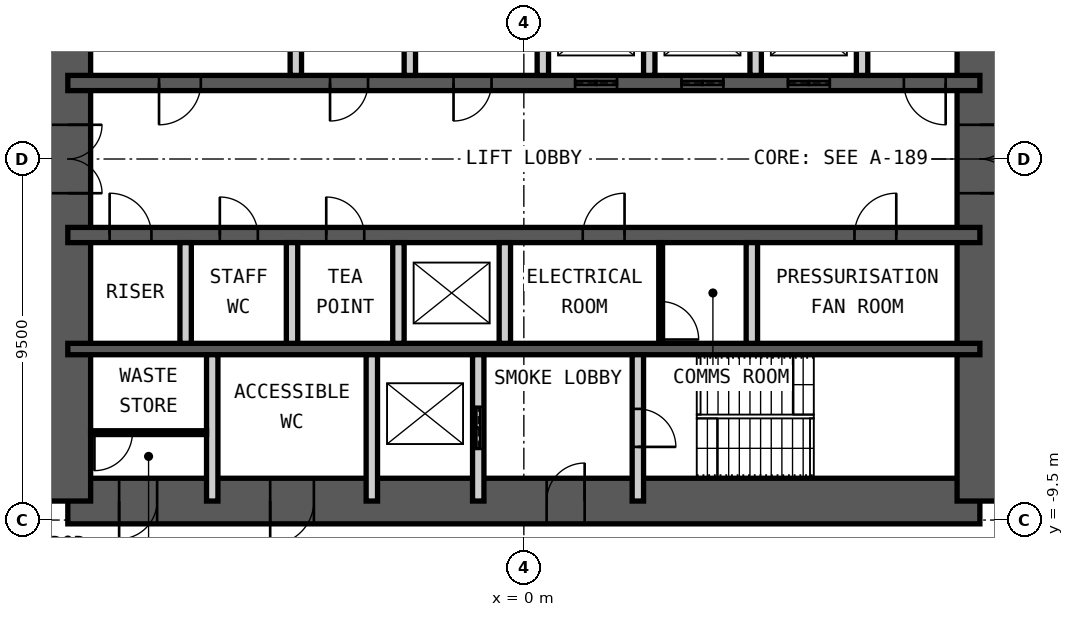
"""IFC4 building model, lengths in metres.
Left out: names, types, materials, properties, quantities, classifications, styles, units other than length and angle.
Written with IfcOpenShell. Run it as: python <this file> out.ifc"""

import sys

from ifc_helpers import new_model, si_unit, direction, frame, frame_2d, origin, place, context, subcontext, project, spatial, rectangle, extrude, element, fill, save


model = new_model("IFC4")
c1 = context("Model", 3, precision=1e-05, world=origin(), true_north=direction((0.0, 1.0)))
c2 = subcontext(c1, "Body", "Model", "MODEL_VIEW")
j1 = project(units=[si_unit("LENGTHUNIT", "METRE"), si_unit("PLANEANGLEUNIT", "RADIAN")], contexts=[c1])
p1 = place(None, origin())
s1 = spatial("IfcSite", under=j1, at=p1, CompositionType="ELEMENT")
p2 = place(p1, origin())
s2 = spatial("IfcBuilding", under=s1, at=p2, CompositionType="ELEMENT")
p3 = place(p2, frame((0.0, 0.0, 188.8)))
s3 = spatial("IfcBuildingStorey", under=s2, at=p3, CompositionType="ELEMENT", Elevation=188.8)
p4 = place(p3, frame((-12.0, -9.0, 0.0), z_axis=(0.0, 0.0, 1.0), x_axis=(1.0, 0.0, 0.0)))
e1 = element("IfcWall", 1, at=p4, inside=s3, PredefinedType="SHEAR", context=c2, shape_type="SweptSolid", body=[
    extrude(rectangle(XDim=24.0, YDim=1.2, at=frame_2d((12.0, 0.0))), origin(), (0.0, 0.0, 1.0), 4.2),
])
p5 = place(p4, frame((1.35, 0.0, 0.0)))
e2 = element("IfcOpeningElement", 2, at=p5, cuts=e1, PredefinedType="OPENING", context=c2, shape_type="SweptSolid", body=[
    extrude(rectangle(XDim=1.0, YDim=2.1, at=frame_2d((0.5, 1.05))), frame((0.0, 0.61, 0.0), z_axis=(0.0, -1.0, 0.0), x_axis=(1.0, 0.0, 0.0)), (0.0, 0.0, 1.0), 1.22),
])
p6 = place(p4, frame((5.325, 0.0, 0.0)))
e3 = element("IfcOpeningElement", 3, at=p6, cuts=e1, PredefinedType="OPENING", context=c2, shape_type="SweptSolid", body=[
    extrude(rectangle(XDim=1.15, YDim=2.1, at=frame_2d((0.575, 1.05))), frame((0.0, 0.61, 0.0), z_axis=(0.0, -1.0, 0.0), x_axis=(1.0, 0.0, 0.0)), (0.0, 0.0, 1.0), 1.22),
])
p7 = place(p4, frame((12.6, 0.0, 0.0)))
e4 = element("IfcOpeningElement", 4, at=p7, cuts=e1, PredefinedType="OPENING", context=c2, shape_type="SweptSolid", body=[
    extrude(rectangle(XDim=1.0, YDim=2.1, at=frame_2d((0.5, 1.05))), frame((0.0, 0.61, 0.0), z_axis=(0.0, -1.0, 0.0), x_axis=(1.0, 0.0, 0.0)), (0.0, 0.0, 1.0), 1.22),
])
p8 = place(p3, frame((12.0, -9.0, 0.0), z_axis=(0.0, 0.0, 1.0), x_axis=(0.0, 1.0, 0.0)))
e5 = element("IfcWall", 5, at=p8, inside=s3, PredefinedType="SHEAR", context=c2, shape_type="SweptSolid", body=[
    extrude(rectangle(XDim=18.0, YDim=1.2, at=frame_2d((9.0, 0.0))), origin(), (0.0, 0.0, 1.0), 4.2),
])
p9 = place(p8, frame((8.1, 0.0, 0.0)))
e6 = element("IfcOpeningElement", 6, at=p9, cuts=e5, PredefinedType="OPENING", context=c2, shape_type="SweptSolid", body=[
    extrude(rectangle(XDim=1.8, YDim=2.1, at=frame_2d((0.9, 1.05))), frame((0.0, 0.61, 0.0), z_axis=(0.0, -1.0, 0.0), x_axis=(1.0, 0.0, 0.0)), (0.0, 0.0, 1.0), 1.22),
])
p10 = place(p3, frame((-12.0, -9.0, 0.0), z_axis=(0.0, 0.0, 1.0), x_axis=(0.0, 1.0, 0.0)))
e7 = element("IfcWall", 7, at=p10, inside=s3, PredefinedType="SHEAR", context=c2, shape_type="SweptSolid", body=[
    extrude(rectangle(XDim=18.0, YDim=1.2, at=frame_2d((9.0, 0.0))), origin(), (0.0, 0.0, 1.0), 4.2),
])
p11 = place(p10, frame((8.1, 0.0, 0.0)))
e8 = element("IfcOpeningElement", 8, at=p11, cuts=e7, PredefinedType="OPENING", context=c2, shape_type="SweptSolid", body=[
    extrude(rectangle(XDim=1.8, YDim=2.1, at=frame_2d((0.9, 1.05))), frame((0.0, 0.61, 0.0), z_axis=(0.0, -1.0, 0.0), x_axis=(1.0, 0.0, 0.0)), (0.0, 0.0, 1.0), 1.22),
])
p12 = place(p3, frame((-12.0, 2.0, 0.0), z_axis=(0.0, 0.0, 1.0), x_axis=(1.0, 0.0, 0.0)))
e9 = element("IfcWall", 9, at=p12, inside=s3, PredefinedType="SHEAR", context=c2, shape_type="SweptSolid", body=[
    extrude(rectangle(XDim=24.0, YDim=0.4, at=frame_2d((12.0, 0.0))), origin(), (0.0, 0.0, 1.0), 4.2),
])
p13 = place(p12, frame((2.4, 0.0, 0.0)))
e10 = element("IfcOpeningElement", 10, at=p13, cuts=e9, PredefinedType="OPENING", context=c2, shape_type="SweptSolid", body=[
    extrude(rectangle(XDim=1.1, YDim=2.1, at=frame_2d((0.55, 1.05))), frame((0.0, 0.21, 0.0), z_axis=(0.0, -1.0, 0.0), x_axis=(1.0, 0.0, 0.0)), (0.0, 0.0, 1.0), 0.42),
])
p14 = place(p12, frame((22.0, 0.0, 0.0)))
e11 = element("IfcOpeningElement", 11, at=p14, cuts=e9, PredefinedType="OPENING", context=c2, shape_type="SweptSolid", body=[
    extrude(rectangle(XDim=1.1, YDim=2.1, at=frame_2d((0.55, 1.05))), frame((0.0, 0.21, 0.0), z_axis=(0.0, -1.0, 0.0), x_axis=(1.0, 0.0, 0.0)), (0.0, 0.0, 1.0), 0.42),
])
p15 = place(p12, frame((10.15, 0.0, 0.0)))
e12 = element("IfcOpeningElement", 12, at=p15, cuts=e9, PredefinedType="OPENING", context=c2, shape_type="SweptSolid", body=[
    extrude(rectangle(XDim=1.0, YDim=2.1, at=frame_2d((0.5, 1.05))), frame((0.0, 0.21, 0.0), z_axis=(0.0, -1.0, 0.0), x_axis=(1.0, 0.0, 0.0)), (0.0, 0.0, 1.0), 0.42),
])
p16 = place(p12, frame((6.9, 0.0, 0.0)))
e13 = element("IfcOpeningElement", 13, at=p16, cuts=e9, PredefinedType="OPENING", context=c2, shape_type="SweptSolid", body=[
    extrude(rectangle(XDim=1.0, YDim=2.1, at=frame_2d((0.5, 1.05))), frame((0.0, 0.21, 0.0), z_axis=(0.0, -1.0, 0.0), x_axis=(1.0, 0.0, 0.0)), (0.0, 0.0, 1.0), 0.42),
])
p17 = place(p12, frame((13.35, 0.0, 0.0)))
e14 = element("IfcOpeningElement", 14, at=p17, cuts=e9, PredefinedType="OPENING", context=c2, shape_type="SweptSolid", body=[
    extrude(rectangle(XDim=1.1, YDim=2.4, at=frame_2d((0.55, 1.2))), frame((0.0, 0.21, 0.0), z_axis=(0.0, -1.0, 0.0), x_axis=(1.0, 0.0, 0.0)), (0.0, 0.0, 1.0), 0.42),
])
p18 = place(p12, frame((16.15, 0.0, 0.0)))
e15 = element("IfcOpeningElement", 15, at=p18, cuts=e9, PredefinedType="OPENING", context=c2, shape_type="SweptSolid", body=[
    extrude(rectangle(XDim=1.1, YDim=2.4, at=frame_2d((0.55, 1.2))), frame((0.0, 0.21, 0.0), z_axis=(0.0, -1.0, 0.0), x_axis=(1.0, 0.0, 0.0)), (0.0, 0.0, 1.0), 0.42),
])
p19 = place(p12, frame((18.95, 0.0, 0.0)))
e16 = element("IfcOpeningElement", 16, at=p19, cuts=e9, PredefinedType="OPENING", context=c2, shape_type="SweptSolid", body=[
    extrude(rectangle(XDim=1.1, YDim=2.4, at=frame_2d((0.55, 1.2))), frame((0.0, 0.21, 0.0), z_axis=(0.0, -1.0, 0.0), x_axis=(1.0, 0.0, 0.0)), (0.0, 0.0, 1.0), 0.42),
])
p20 = place(p3, frame((-12.0, -2.0, 0.0), z_axis=(0.0, 0.0, 1.0), x_axis=(1.0, 0.0, 0.0)))
e17 = element("IfcWall", 17, at=p20, inside=s3, PredefinedType="SHEAR", context=c2, shape_type="SweptSolid", body=[
    extrude(rectangle(XDim=24.0, YDim=0.4, at=frame_2d((12.0, 0.0))), origin(), (0.0, 0.0, 1.0), 4.2),
])
p21 = place(p20, frame((1.1, 0.0, 0.0)))
e18 = element("IfcOpeningElement", 18, at=p21, cuts=e17, PredefinedType="OPENING", context=c2, shape_type="SweptSolid", body=[
    extrude(rectangle(XDim=1.1, YDim=2.1, at=frame_2d((0.55, 1.05))), frame((0.0, 0.21, 0.0), z_axis=(0.0, -1.0, 0.0), x_axis=(1.0, 0.0, 0.0)), (0.0, 0.0, 1.0), 0.42),
])
p22 = place(p20, frame((13.55, 0.0, 0.0)))
e19 = element("IfcOpeningElement", 19, at=p22, cuts=e17, PredefinedType="OPENING", context=c2, shape_type="SweptSolid", body=[
    extrude(rectangle(XDim=1.1, YDim=2.1, at=frame_2d((0.55, 1.05))), frame((0.0, 0.21, 0.0), z_axis=(0.0, -1.0, 0.0), x_axis=(1.0, 0.0, 0.0)), (0.0, 0.0, 1.0), 0.42),
])
p23 = place(p20, frame((20.7, 0.0, 0.0)))
e20 = element("IfcOpeningElement", 20, at=p23, cuts=e17, PredefinedType="OPENING", context=c2, shape_type="SweptSolid", body=[
    extrude(rectangle(XDim=1.1, YDim=2.1, at=frame_2d((0.55, 1.05))), frame((0.0, 0.21, 0.0), z_axis=(0.0, -1.0, 0.0), x_axis=(1.0, 0.0, 0.0)), (0.0, 0.0, 1.0), 0.42),
])
p24 = place(p20, frame((4.0, 0.0, 0.0)))
e21 = element("IfcOpeningElement", 21, at=p24, cuts=e17, PredefinedType="OPENING", context=c2, shape_type="SweptSolid", body=[
    extrude(rectangle(XDim=1.0, YDim=2.1, at=frame_2d((0.5, 1.05))), frame((0.0, 0.21, 0.0), z_axis=(0.0, -1.0, 0.0), x_axis=(1.0, 0.0, 0.0)), (0.0, 0.0, 1.0), 0.42),
])
p25 = place(p20, frame((6.8, 0.0, 0.0)))
e22 = element("IfcOpeningElement", 22, at=p25, cuts=e17, PredefinedType="OPENING", context=c2, shape_type="SweptSolid", body=[
    extrude(rectangle(XDim=1.0, YDim=2.1, at=frame_2d((0.5, 1.05))), frame((0.0, 0.21, 0.0), z_axis=(0.0, -1.0, 0.0), x_axis=(1.0, 0.0, 0.0)), (0.0, 0.0, 1.0), 0.42),
])
p26 = place(p3, frame((-12.0, -5.0, 0.0), z_axis=(0.0, 0.0, 1.0), x_axis=(1.0, 0.0, 0.0)))
e23 = element("IfcWall", 23, at=p26, inside=s3, PredefinedType="SHEAR", context=c2, shape_type="SweptSolid", body=[
    extrude(rectangle(XDim=24.0, YDim=0.3, at=frame_2d((12.0, 0.0))), origin(), (0.0, 0.0, 1.0), 4.2),
])
for number, where, z_axis, x_axis in (
    (24, (-6.0, 2.2, 0.0), (0.0, 0.0, 1.0), (0.0, 1.0, 0.0)),
    (25, (-3.0, 2.2, 0.0), (0.0, 0.0, 1.0), (0.0, 1.0, 0.0)),
    (26, (0.5, 2.2, 0.0), (0.0, 0.0, 1.0), (0.0, 1.0, 0.0)),
    (27, (3.3, 2.2, 0.0), (0.0, 0.0, 1.0), (0.0, 1.0, 0.0)),
    (28, (6.1, 2.2, 0.0), (0.0, 0.0, 1.0), (0.0, 1.0, 0.0)),
    (29, (8.9, 2.2, 0.0), (0.0, 0.0, 1.0), (0.0, 1.0, 0.0)),
    (30, (-8.9, -4.85, 0.0), (0.0, 0.0, 1.0), (0.0, 1.0, 0.0)),
    (31, (-6.1, -4.85, 0.0), (0.0, 0.0, 1.0), (0.0, 1.0, 0.0)),
    (32, (-3.3, -4.85, 0.0), (0.0, 0.0, 1.0), (0.0, 1.0, 0.0)),
    (33, (-0.5, -4.85, 0.0), (0.0, 0.0, 1.0), (0.0, 1.0, 0.0)),
    (34, (6.0, -4.85, 0.0), (0.0, 0.0, 1.0), (0.0, 1.0, 0.0)),
):
    element("IfcWall", number, at=place(p3, frame(where, z_axis=z_axis, x_axis=x_axis)), inside=s3, PredefinedType="PARTITIONING", context=c2, shape_type="SweptSolid", body=[
        extrude(rectangle(XDim=2.65, YDim=0.3, at=frame_2d((1.325, 0.0))), origin(), (0.0, 0.0, 1.0), 3.98),
    ])
for number, where, z_axis, x_axis in (
    (35, (-8.2, -9.0, 0.0), (0.0, 0.0, 1.0), (0.0, 1.0, 0.0)),
    (36, (-4.0, -9.0, 0.0), (0.0, 0.0, 1.0), (0.0, 1.0, 0.0)),
):
    element("IfcWall", number, at=place(p3, frame(where, z_axis=z_axis, x_axis=x_axis)), inside=s3, PredefinedType="PARTITIONING", context=c2, shape_type="SweptSolid", body=[
        extrude(rectangle(XDim=3.85, YDim=0.3, at=frame_2d((1.925, 0.0))), origin(), (0.0, 0.0, 1.0), 3.98),
    ])
p27 = place(p3, frame((-1.2, -9.0, 0.0), z_axis=(0.0, 0.0, 1.0), x_axis=(0.0, 1.0, 0.0)))
e37 = element("IfcWall", 37, at=p27, inside=s3, PredefinedType="PARTITIONING", context=c2, shape_type="SweptSolid", body=[
    extrude(rectangle(XDim=3.85, YDim=0.3, at=frame_2d((1.925, 0.0))), origin(), (0.0, 0.0, 1.0), 3.98),
])
p28 = place(p27, frame((1.375, 0.0, 0.0)))
e38 = element("IfcOpeningElement", 38, at=p28, cuts=e37, PredefinedType="OPENING", context=c2, shape_type="SweptSolid", body=[
    extrude(rectangle(XDim=1.1, YDim=2.4, at=frame_2d((0.55, 1.2))), frame((0.0, 0.16, 0.0), z_axis=(0.0, -1.0, 0.0), x_axis=(1.0, 0.0, 0.0)), (0.0, 0.0, 1.0), 0.32),
])
p29 = place(p3, frame((3.0, -9.0, 0.0), z_axis=(0.0, 0.0, 1.0), x_axis=(0.0, 1.0, 0.0)))
e39 = element("IfcWall", 39, at=p29, inside=s3, PredefinedType="PARTITIONING", context=c2, shape_type="SweptSolid", body=[
    extrude(rectangle(XDim=3.85, YDim=0.3, at=frame_2d((1.925, 0.0))), origin(), (0.0, 0.0, 1.0), 3.98),
])
p30 = place(p29, frame((1.425, 0.0, 0.0)))
e40 = element("IfcOpeningElement", 40, at=p30, cuts=e39, PredefinedType="OPENING", context=c2, shape_type="SweptSolid", body=[
    extrude(rectangle(XDim=1.0, YDim=2.1, at=frame_2d((0.5, 1.05))), frame((0.0, 0.16, 0.0), z_axis=(0.0, -1.0, 0.0), x_axis=(1.0, 0.0, 0.0)), (0.0, 0.0, 1.0), 0.32),
])
p31 = place(p3, frame((3.6, -4.85, 0.0), z_axis=(0.0, 0.0, 1.0), x_axis=(0.0, 1.0, 0.0)))
e41 = element("IfcWall", 41, at=p31, inside=s3, PredefinedType="PARTITIONING", context=c2, shape_type="SweptSolid", body=[
    extrude(rectangle(XDim=2.65, YDim=0.1, at=frame_2d((1.325, 0.0))), origin(), (0.0, 0.0, 1.0), 3.98),
])
p32 = place(p31, frame((0.1, 0.0, 0.0)))
e42 = element("IfcOpeningElement", 42, at=p32, cuts=e41, PredefinedType="OPENING", context=c2, shape_type="SweptSolid", body=[
    extrude(rectangle(XDim=1.0, YDim=2.4, at=frame_2d((0.5, 1.2))), frame((0.0, 0.06, 0.0), z_axis=(0.0, -1.0, 0.0), x_axis=(1.0, 0.0, 0.0)), (0.0, 0.0, 1.0), 0.12),
])
p33 = place(p3, frame((-11.4, -7.2, 0.0), z_axis=(0.0, 0.0, 1.0), x_axis=(1.0, 0.0, 0.0)))
e43 = element("IfcWall", 43, at=p33, inside=s3, PredefinedType="PARTITIONING", context=c2, shape_type="SweptSolid", body=[
    extrude(rectangle(XDim=3.05, YDim=0.1, at=frame_2d((1.525, 0.0))), origin(), (0.0, 0.0, 1.0), 3.98),
])
p34 = place(p33, frame((0.1, 0.0, 0.0)))
e44 = element("IfcOpeningElement", 44, at=p34, cuts=e43, PredefinedType="OPENING", context=c2, shape_type="SweptSolid", body=[
    extrude(rectangle(XDim=1.0, YDim=2.4, at=frame_2d((0.5, 1.2))), frame((0.0, 0.06, 0.0), z_axis=(0.0, -1.0, 0.0), x_axis=(1.0, 0.0, 0.0)), (0.0, 0.0, 1.0), 0.12),
])
p35 = place(p5, origin())
e45 = element("IfcDoor", 45, at=p35, inside=s3, OperationType="SINGLE_SWING_LEFT", PredefinedType="DOOR", context=c2, shape_type="SweptSolid", body=[
    extrude(rectangle(XDim=1.0, YDim=2.1, at=frame_2d((0.5, 1.05))), frame((0.0, 0.025, 0.0), z_axis=(0.0, -1.0, 0.0), x_axis=(1.0, 0.0, 0.0)), (0.0, 0.0, 1.0), 0.05),
])
fill(e2, e45)
p36 = place(p6, origin())
e46 = element("IfcDoor", 46, at=p36, inside=s3, OperationType="SINGLE_SWING_LEFT", PredefinedType="DOOR", context=c2, shape_type="SweptSolid", body=[
    extrude(rectangle(XDim=1.15, YDim=2.1, at=frame_2d((0.575, 1.05))), frame((0.0, 0.025, 0.0), z_axis=(0.0, -1.0, 0.0), x_axis=(1.0, 0.0, 0.0)), (0.0, 0.0, 1.0), 0.05),
])
fill(e3, e46)
p37 = place(p7, origin())
e47 = element("IfcDoor", 47, at=p37, inside=s3, OperationType="SINGLE_SWING_LEFT", PredefinedType="DOOR", context=c2, shape_type="SweptSolid", body=[
    extrude(rectangle(XDim=1.0, YDim=2.1, at=frame_2d((0.5, 1.05))), frame((0.0, 0.025, 0.0), z_axis=(0.0, -1.0, 0.0), x_axis=(1.0, 0.0, 0.0)), (0.0, 0.0, 1.0), 0.05),
])
fill(e4, e47)
p38 = place(p30, origin())
e48 = element("IfcDoor", 48, at=p38, inside=s3, OperationType="SINGLE_SWING_LEFT", PredefinedType="DOOR", context=c2, shape_type="SweptSolid", body=[
    extrude(rectangle(XDim=1.0, YDim=2.1, at=frame_2d((0.5, 1.05))), frame((0.0, 0.025, 0.0), z_axis=(0.0, -1.0, 0.0), x_axis=(1.0, 0.0, 0.0)), (0.0, 0.0, 1.0), 0.05),
])
fill(e40, e48)
p39 = place(p13, origin())
e49 = element("IfcDoor", 49, at=p39, inside=s3, OperationType="SINGLE_SWING_LEFT", PredefinedType="DOOR", context=c2, shape_type="SweptSolid", body=[
    extrude(rectangle(XDim=1.1, YDim=2.1, at=frame_2d((0.55, 1.05))), frame((0.0, 0.025, 0.0), z_axis=(0.0, -1.0, 0.0), x_axis=(1.0, 0.0, 0.0)), (0.0, 0.0, 1.0), 0.05),
])
fill(e10, e49)
p40 = place(p21, origin())
e50 = element("IfcDoor", 50, at=p40, inside=s3, OperationType="SINGLE_SWING_RIGHT", PredefinedType="DOOR", context=c2, shape_type="SweptSolid", body=[
    extrude(rectangle(XDim=1.1, YDim=2.1, at=frame_2d((0.55, 1.05))), frame((0.0, 0.025, 0.0), z_axis=(0.0, -1.0, 0.0), x_axis=(1.0, 0.0, 0.0)), (0.0, 0.0, 1.0), 0.05),
])
fill(e18, e50)
p41 = place(p14, origin())
e51 = element("IfcDoor", 51, at=p41, inside=s3, OperationType="SINGLE_SWING_RIGHT", PredefinedType="DOOR", context=c2, shape_type="SweptSolid", body=[
    extrude(rectangle(XDim=1.1, YDim=2.1, at=frame_2d((0.55, 1.05))), frame((0.0, 0.025, 0.0), z_axis=(0.0, -1.0, 0.0), x_axis=(1.0, 0.0, 0.0)), (0.0, 0.0, 1.0), 0.05),
])
fill(e11, e51)
p42 = place(p15, origin())
e52 = element("IfcDoor", 52, at=p42, inside=s3, OperationType="SINGLE_SWING_LEFT", PredefinedType="DOOR", context=c2, shape_type="SweptSolid", body=[
    extrude(rectangle(XDim=1.0, YDim=2.1, at=frame_2d((0.5, 1.05))), frame((0.0, 0.025, 0.0), z_axis=(0.0, -1.0, 0.0), x_axis=(1.0, 0.0, 0.0)), (0.0, 0.0, 1.0), 0.05),
])
fill(e12, e52)
p43 = place(p22, origin())
e53 = element("IfcDoor", 53, at=p43, inside=s3, OperationType="SINGLE_SWING_LEFT", PredefinedType="DOOR", context=c2, shape_type="SweptSolid", body=[
    extrude(rectangle(XDim=1.1, YDim=2.1, at=frame_2d((0.55, 1.05))), frame((0.0, 0.025, 0.0), z_axis=(0.0, -1.0, 0.0), x_axis=(1.0, 0.0, 0.0)), (0.0, 0.0, 1.0), 0.05),
])
fill(e19, e53)
p44 = place(p23, origin())
e54 = element("IfcDoor", 54, at=p44, inside=s3, OperationType="SINGLE_SWING_LEFT", PredefinedType="DOOR", context=c2, shape_type="SweptSolid", body=[
    extrude(rectangle(XDim=1.1, YDim=2.1, at=frame_2d((0.55, 1.05))), frame((0.0, 0.025, 0.0), z_axis=(0.0, -1.0, 0.0), x_axis=(1.0, 0.0, 0.0)), (0.0, 0.0, 1.0), 0.05),
])
fill(e20, e54)
p45 = place(p9, origin())
e55 = element("IfcDoor", 55, at=p45, inside=s3, OperationType="DOUBLE_DOOR_DOUBLE_SWING", PredefinedType="DOOR", context=c2, shape_type="SweptSolid", body=[
    extrude(rectangle(XDim=1.8, YDim=2.1, at=frame_2d((0.9, 1.05))), frame((0.0, 0.025, 0.0), z_axis=(0.0, -1.0, 0.0), x_axis=(1.0, 0.0, 0.0)), (0.0, 0.0, 1.0), 0.05),
])
fill(e6, e55)
p46 = place(p11, origin())
e56 = element("IfcDoor", 56, at=p46, inside=s3, OperationType="DOUBLE_DOOR_DOUBLE_SWING", PredefinedType="DOOR", context=c2, shape_type="SweptSolid", body=[
    extrude(rectangle(XDim=1.8, YDim=2.1, at=frame_2d((0.9, 1.05))), frame((0.0, 0.025, 0.0), z_axis=(0.0, -1.0, 0.0), x_axis=(1.0, 0.0, 0.0)), (0.0, 0.0, 1.0), 0.05),
])
fill(e8, e56)
p47 = place(p28, origin())
e57 = element("IfcDoor", 57, at=p47, inside=s3, OperationType="DOUBLE_DOOR_SLIDING", PredefinedType="DOOR", context=c2, shape_type="SweptSolid", body=[
    extrude(rectangle(XDim=1.1, YDim=2.4, at=frame_2d((0.55, 1.2))), frame((0.0, 0.025, 0.0), z_axis=(0.0, -1.0, 0.0), x_axis=(1.0, 0.0, 0.0)), (0.0, 0.0, 1.0), 0.05),
])
fill(e38, e57)
p48 = place(p16, origin())
e58 = element("IfcDoor", 58, at=p48, inside=s3, OperationType="SINGLE_SWING_LEFT", PredefinedType="DOOR", context=c2, shape_type="SweptSolid", body=[
    extrude(rectangle(XDim=1.0, YDim=2.1, at=frame_2d((0.5, 1.05))), frame((0.0, 0.025, 0.0), z_axis=(0.0, -1.0, 0.0), x_axis=(1.0, 0.0, 0.0)), (0.0, 0.0, 1.0), 0.05),
])
fill(e13, e58)
p49 = place(p17, origin())
e59 = element("IfcDoor", 59, at=p49, inside=s3, OperationType="DOUBLE_DOOR_SLIDING", PredefinedType="DOOR", context=c2, shape_type="SweptSolid", body=[
    extrude(rectangle(XDim=1.1, YDim=2.4, at=frame_2d((0.55, 1.2))), frame((0.0, 0.025, 0.0), z_axis=(0.0, -1.0, 0.0), x_axis=(1.0, 0.0, 0.0)), (0.0, 0.0, 1.0), 0.05),
])
fill(e14, e59)
p50 = place(p18, origin())
e60 = element("IfcDoor", 60, at=p50, inside=s3, OperationType="DOUBLE_DOOR_SLIDING", PredefinedType="DOOR", context=c2, shape_type="SweptSolid", body=[
    extrude(rectangle(XDim=1.1, YDim=2.4, at=frame_2d((0.55, 1.2))), frame((0.0, 0.025, 0.0), z_axis=(0.0, -1.0, 0.0), x_axis=(1.0, 0.0, 0.0)), (0.0, 0.0, 1.0), 0.05),
])
fill(e15, e60)
p51 = place(p19, origin())
e61 = element("IfcDoor", 61, at=p51, inside=s3, OperationType="DOUBLE_DOOR_SLIDING", PredefinedType="DOOR", context=c2, shape_type="SweptSolid", body=[
    extrude(rectangle(XDim=1.1, YDim=2.4, at=frame_2d((0.55, 1.2))), frame((0.0, 0.025, 0.0), z_axis=(0.0, -1.0, 0.0), x_axis=(1.0, 0.0, 0.0)), (0.0, 0.0, 1.0), 0.05),
])
fill(e16, e61)
p52 = place(p24, origin())
e62 = element("IfcDoor", 62, at=p52, inside=s3, OperationType="SINGLE_SWING_RIGHT", PredefinedType="DOOR", context=c2, shape_type="SweptSolid", body=[
    extrude(rectangle(XDim=1.0, YDim=2.1, at=frame_2d((0.5, 1.05))), frame((0.0, 0.025, 0.0), z_axis=(0.0, -1.0, 0.0), x_axis=(1.0, 0.0, 0.0)), (0.0, 0.0, 1.0), 0.05),
])
fill(e21, e62)
p53 = place(p25, origin())
e63 = element("IfcDoor", 63, at=p53, inside=s3, OperationType="SINGLE_SWING_RIGHT", PredefinedType="DOOR", context=c2, shape_type="SweptSolid", body=[
    extrude(rectangle(XDim=1.0, YDim=2.1, at=frame_2d((0.5, 1.05))), frame((0.0, 0.025, 0.0), z_axis=(0.0, -1.0, 0.0), x_axis=(1.0, 0.0, 0.0)), (0.0, 0.0, 1.0), 0.05),
])
fill(e22, e63)
p54 = place(p32, origin())
e64 = element("IfcDoor", 64, at=p54, inside=s3, OperationType="SINGLE_SWING_LEFT", PredefinedType="DOOR", context=c2, shape_type="SweptSolid", body=[
    extrude(rectangle(XDim=1.0, YDim=2.4, at=frame_2d((0.5, 1.2))), frame((0.0, 0.025, 0.0), z_axis=(0.0, -1.0, 0.0), x_axis=(1.0, 0.0, 0.0)), (0.0, 0.0, 1.0), 0.05),
])
fill(e42, e64)
p55 = place(p34, origin())
e65 = element("IfcDoor", 65, at=p55, inside=s3, OperationType="SINGLE_SWING_LEFT", PredefinedType="DOOR", context=c2, shape_type="SweptSolid", body=[
    extrude(rectangle(XDim=1.0, YDim=2.4, at=frame_2d((0.5, 1.2))), frame((0.0, 0.025, 0.0), z_axis=(0.0, -1.0, 0.0), x_axis=(1.0, 0.0, 0.0)), (0.0, 0.0, 1.0), 0.05),
])
fill(e44, e65)
save(model, sys.argv[1])
